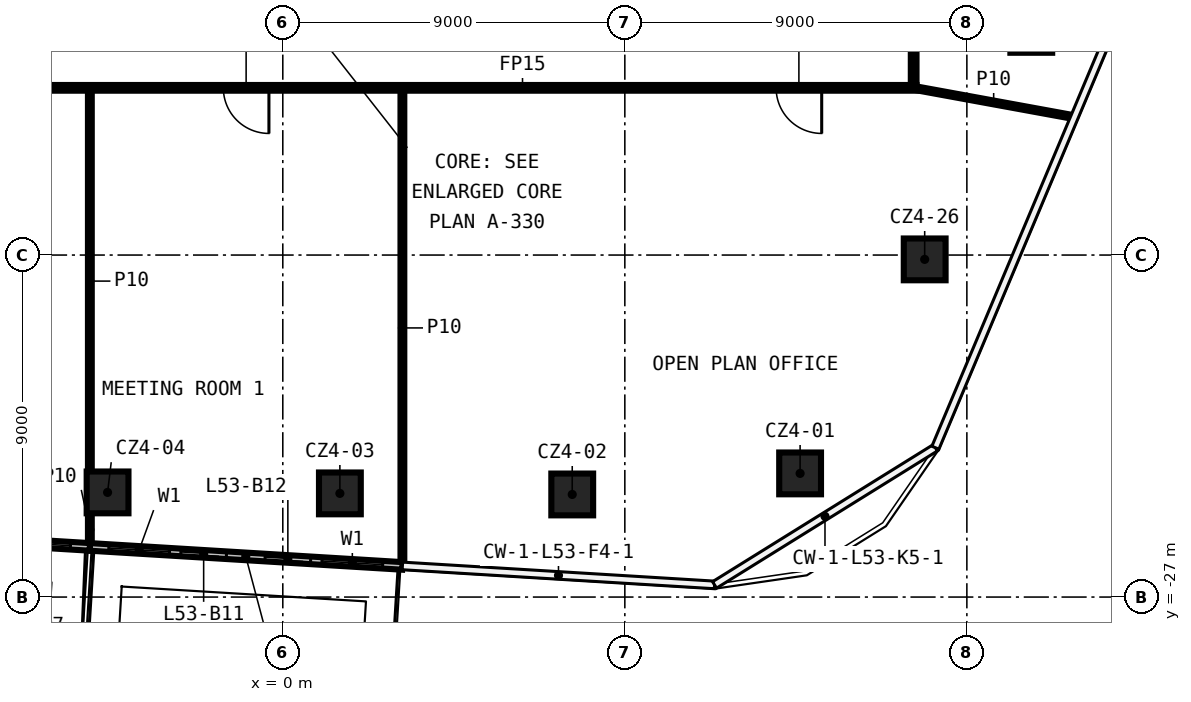
"""IFC4 building model, lengths in metres.
Left out: names, types, materials, properties, quantities, classifications, styles, units other than length and angle.
Written with IfcOpenShell. Run it as: python <this file> out.ifc"""

import sys

from ifc_helpers import new_model, si_unit, direction, frame, frame_2d, origin, origin_2d, place, context, subcontext, project, spatial, rectangle, extrude, element, fill, save


model = new_model("IFC4")
c1 = context("Model", 3, precision=1e-05, world=origin(), true_north=direction((0.0, 1.0)))
c2 = subcontext(c1, "Body", "Model", "MODEL_VIEW")
j1 = project(units=[si_unit("LENGTHUNIT", "METRE"), si_unit("PLANEANGLEUNIT", "RADIAN")], contexts=[c1])
p1 = place(None, origin())
s1 = spatial("IfcSite", under=j1, at=p1, CompositionType="ELEMENT")
p2 = place(p1, origin())
s2 = spatial("IfcBuilding", under=s1, at=p2, CompositionType="ELEMENT")
p3 = place(p2, frame((0.0, 0.0, 253.8)))
s3 = spatial("IfcBuildingStorey", under=s2, at=p3, CompositionType="ELEMENT", Elevation=253.8)
for number, where, z_axis, x_axis in (
    (1, (13.612, -23.746, 0.0), (0.0, 0.0, 1.0), (1.0, 0.0, 0.0)),
    (2, (7.616, -24.3, 0.0), (0.0, 0.0, 1.0), (1.0, 0.0, 0.0)),
    (3, (1.502, -24.272, 0.0), (0.0, 0.0, 1.0), (1.0, 0.0, 0.0)),
    (4, (-4.611, -24.246, 0.0), (0.0, 0.0, 1.0), (1.0, 0.0, 0.0)),
    (5, (19.695, -12.127, 0.0), (0.0, 0.0, 1.0), (1.0, 0.0, 0.0)),
    (6, (16.89, -18.114, 0.0), (0.0, 0.0, 1.0), (1.0, 0.0, 0.0)),
):
    element("IfcColumn", number, at=place(p3, frame(where, z_axis=z_axis, x_axis=x_axis)), inside=s3, PredefinedType="COLUMN", context=c2, shape_type="SweptSolid", body=[
        extrude(rectangle(XDim=1.1, YDim=1.1, at=origin_2d()), origin(), (0.0, 0.0, 1.0), 3.82),
    ])
p4 = place(p3, frame((16.675, -13.6, 0.0), z_axis=(0.0, 0.0, 1.0), x_axis=(-1.0, 0.0, 0.0)))
e7 = element("IfcWall", 7, at=p4, inside=s3, PredefinedType="PARTITIONING", context=c2, shape_type="SweptSolid", body=[
    extrude(rectangle(XDim=32.75, YDim=0.15, at=frame_2d((16.375, 0.0))), origin(), (0.0, 0.0, 1.0), 3.82),
])
p5 = place(p4, frame((29.587, 0.0, 0.0)))
e8 = element("IfcOpeningElement", 8, at=p5, cuts=e7, PredefinedType="OPENING", context=c2, shape_type="SweptSolid", body=[
    extrude(rectangle(XDim=1.2, YDim=2.1, at=frame_2d((0.6, 1.05))), frame((0.0, 0.085, 0.0), z_axis=(0.0, -1.0, 0.0), x_axis=(1.0, 0.0, 0.0)), (0.0, 0.0, 1.0), 0.17),
])
p6 = place(p4, frame((17.04, 0.0, 0.0)))
e9 = element("IfcOpeningElement", 9, at=p6, cuts=e7, PredefinedType="OPENING", context=c2, shape_type="SweptSolid", body=[
    extrude(rectangle(XDim=1.2, YDim=2.1, at=frame_2d((0.6, 1.05))), frame((0.0, 0.085, 0.0), z_axis=(0.0, -1.0, 0.0), x_axis=(1.0, 0.0, 0.0)), (0.0, 0.0, 1.0), 0.17),
])
p7 = place(p4, frame((2.495, 0.0, 0.0)))
e10 = element("IfcOpeningElement", 10, at=p7, cuts=e7, PredefinedType="OPENING", context=c2, shape_type="SweptSolid", body=[
    extrude(rectangle(XDim=1.2, YDim=2.1, at=frame_2d((0.6, 1.05))), frame((0.0, 0.085, 0.0), z_axis=(0.0, -1.0, 0.0), x_axis=(1.0, 0.0, 0.0)), (0.0, 0.0, 1.0), 0.17),
])
p8 = place(p3, frame((16.6, 13.525, 0.0), z_axis=(0.0, 0.0, 1.0), x_axis=(0.0, -1.0, 0.0)))
e11 = element("IfcWall", 11, at=p8, inside=s3, PredefinedType="PARTITIONING", context=c2, shape_type="SweptSolid", body=[
    extrude(rectangle(XDim=27.05, YDim=0.15, at=frame_2d((13.525, 0.0))), origin(), (0.0, 0.0, 1.0), 3.82),
])
p9 = place(p8, frame((22.559, 0.0, 0.0)))
e12 = element("IfcOpeningElement", 12, at=p9, cuts=e11, PredefinedType="OPENING", context=c2, shape_type="SweptSolid", body=[
    extrude(rectangle(XDim=1.2, YDim=2.1, at=frame_2d((0.6, 1.05))), frame((0.0, 0.085, 0.0), z_axis=(0.0, -1.0, 0.0), x_axis=(1.0, 0.0, 0.0)), (0.0, 0.0, 1.0), 0.17),
])
p10 = place(p8, frame((11.036, 0.0, 0.0)))
e13 = element("IfcOpeningElement", 13, at=p10, cuts=e11, PredefinedType="OPENING", context=c2, shape_type="SweptSolid", body=[
    extrude(rectangle(XDim=1.2, YDim=2.1, at=frame_2d((0.6, 1.05))), frame((0.0, 0.085, 0.0), z_axis=(0.0, -1.0, 0.0), x_axis=(1.0, 0.0, 0.0)), (0.0, 0.0, 1.0), 0.17),
])
p11 = place(p3, frame((3.147, -26.161, 0.0), z_axis=(0.0, 0.0, 1.0), x_axis=(0.0, 1.0, 0.0)))
e14 = element("IfcWall", 14, at=p11, inside=s3, PredefinedType="PARTITIONING", context=c2, shape_type="SweptSolid", body=[
    extrude(rectangle(XDim=12.486, YDim=0.1, at=frame_2d((6.243, 0.0))), origin(), (0.0, 0.0, 1.0), 3.82),
])
p12 = place(p3, frame((-5.077, -25.66, 0.0), z_axis=(0.0, 0.0, 1.0), x_axis=(0.0, 1.0, 0.0)))
e15 = element("IfcWall", 15, at=p12, inside=s3, PredefinedType="PARTITIONING", context=c2, shape_type="SweptSolid", body=[
    extrude(rectangle(XDim=0.864, YDim=0.1, at=frame_2d((0.432, 0.0))), origin(), (0.0, 0.0, 1.0), 3.82),
])
p13 = place(p3, frame((-5.077, -23.696, 0.0), z_axis=(0.0, 0.0, 1.0), x_axis=(0.0, 1.0, 0.0)))
e16 = element("IfcWall", 16, at=p13, inside=s3, PredefinedType="PARTITIONING", context=c2, shape_type="SweptSolid", body=[
    extrude(rectangle(XDim=10.021, YDim=0.1, at=frame_2d((5.01, 0.0))), origin(), (0.0, 0.0, 1.0), 3.82),
])
p14 = place(p3, frame((16.6, -13.6, 0.0), z_axis=(0.0, 0.0, 1.0), x_axis=(0.983699688502, -0.179819139254, 0.0)))
e17 = element("IfcWall", 17, at=p14, inside=s3, PredefinedType="PARTITIONING", context=c2, shape_type="SweptSolid", body=[
    extrude(rectangle(XDim=4.28, YDim=0.1, at=frame_2d((2.14, 0.0))), origin(), (0.0, 0.0, 1.0), 3.82),
])
p15 = place(p3, frame((-5.077, -25.68, 0.0), z_axis=(0.0, 0.0, 1.0), x_axis=(0.998153501879, -0.060741968084, 0.0)))
e18 = element("IfcWall", 18, at=p15, inside=s3, PredefinedType="SOLIDWALL", context=c2, shape_type="SweptSolid", body=[
    extrude(rectangle(XDim=8.24, YDim=0.2, at=frame_2d((4.12, 0.0))), origin(), (0.0, 0.0, 1.0), 3.82),
])
p16 = place(p15, frame((0.5, 0.0, 0.6)))
e19 = element("IfcOpeningElement", 19, at=p16, cuts=e18, PredefinedType="OPENING", context=c2, shape_type="SweptSolid", body=[
    extrude(rectangle(XDim=1.6, YDim=2.4, at=frame_2d((0.8, 1.2))), frame((0.0, 0.11, 0.0), z_axis=(0.0, -1.0, 0.0), x_axis=(1.0, 0.0, 0.0)), (0.0, 0.0, 1.0), 0.22),
])
p17 = place(p15, frame((2.4, 0.0, 0.0)))
e20 = element("IfcOpeningElement", 20, at=p17, cuts=e18, PredefinedType="OPENING", context=c2, shape_type="SweptSolid", body=[
    extrude(rectangle(XDim=1.2, YDim=2.4, at=frame_2d((0.6, 1.2))), frame((0.0, 0.11, 0.0), z_axis=(0.0, -1.0, 0.0), x_axis=(1.0, 0.0, 0.0)), (0.0, 0.0, 1.0), 0.22),
])
p18 = place(p15, frame((6.12, 0.0, 0.6)))
e21 = element("IfcOpeningElement", 21, at=p18, cuts=e18, PredefinedType="OPENING", context=c2, shape_type="SweptSolid", body=[
    extrude(rectangle(XDim=1.6, YDim=2.4, at=frame_2d((0.8, 1.2))), frame((0.0, 0.11, 0.0), z_axis=(0.0, -1.0, 0.0), x_axis=(1.0, 0.0, 0.0)), (0.0, 0.0, 1.0), 0.22),
])
p19 = place(p15, frame((4.62, 0.0, 0.0)))
e22 = element("IfcOpeningElement", 22, at=p19, cuts=e18, PredefinedType="OPENING", context=c2, shape_type="SweptSolid", body=[
    extrude(rectangle(XDim=1.2, YDim=2.4, at=frame_2d((0.6, 1.2))), frame((0.0, 0.11, 0.0), z_axis=(0.0, -1.0, 0.0), x_axis=(1.0, 0.0, 0.0)), (0.0, 0.0, 1.0), 0.22),
])
p20 = place(p3, frame((-9.181, -25.43, 0.0), z_axis=(0.0, 0.0, 1.0), x_axis=(0.998152924564, -0.060751454178, 0.0)))
e23 = element("IfcWall", 23, at=p20, inside=s3, PredefinedType="SOLIDWALL", context=c2, shape_type="SweptSolid", body=[
    extrude(rectangle(XDim=4.111, YDim=0.2, at=frame_2d((2.056, 0.0))), origin(), (0.0, 0.0, 1.0), 3.82),
])
p21 = place(p20, frame((2.0, 0.0, 0.6)))
e24 = element("IfcOpeningElement", 24, at=p21, cuts=e23, PredefinedType="OPENING", context=c2, shape_type="SweptSolid", body=[
    extrude(rectangle(XDim=1.6, YDim=2.4, at=frame_2d((0.8, 1.2))), frame((0.0, 0.11, 0.0), z_axis=(0.0, -1.0, 0.0), x_axis=(1.0, 0.0, 0.0)), (0.0, 0.0, 1.0), 0.22),
])
p22 = place(p20, frame((0.5, 0.0, 0.0)))
e25 = element("IfcOpeningElement", 25, at=p22, cuts=e23, PredefinedType="OPENING", context=c2, shape_type="SweptSolid", body=[
    extrude(rectangle(XDim=1.2, YDim=2.4, at=frame_2d((0.6, 1.2))), frame((0.0, 0.11, 0.0), z_axis=(0.0, -1.0, 0.0), x_axis=(1.0, 0.0, 0.0)), (0.0, 0.0, 1.0), 0.22),
])
p23 = place(p6, origin())
e26 = element("IfcDoor", 26, at=p23, inside=s3, OperationType="SINGLE_SWING_LEFT", PredefinedType="DOOR", context=c2, shape_type="SweptSolid", body=[
    extrude(rectangle(XDim=1.2, YDim=2.1, at=frame_2d((0.6, 1.05))), frame((0.0, 0.025, 0.0), z_axis=(0.0, -1.0, 0.0), x_axis=(1.0, 0.0, 0.0)), (0.0, 0.0, 1.0), 0.05),
])
fill(e9, e26)
p24 = place(p7, origin())
e27 = element("IfcDoor", 27, at=p24, inside=s3, OperationType="SINGLE_SWING_RIGHT", PredefinedType="DOOR", context=c2, shape_type="SweptSolid", body=[
    extrude(rectangle(XDim=1.2, YDim=2.1, at=frame_2d((0.6, 1.05))), frame((0.0, 0.025, 0.0), z_axis=(0.0, -1.0, 0.0), x_axis=(1.0, 0.0, 0.0)), (0.0, 0.0, 1.0), 0.05),
])
fill(e10, e27)
p25 = place(p16, origin())
e28 = element("IfcWindow", 28, at=p25, inside=s3, PartitioningType="SINGLE_PANEL", PredefinedType="WINDOW", context=c2, shape_type="SweptSolid", body=[
    extrude(rectangle(XDim=1.6, YDim=2.4, at=frame_2d((0.8, 1.2))), frame((0.0, 0.03, 0.0), z_axis=(0.0, -1.0, 0.0), x_axis=(1.0, 0.0, 0.0)), (0.0, 0.0, 1.0), 0.06),
])
fill(e19, e28)
p26 = place(p17, origin())
e29 = element("IfcDoor", 29, at=p26, inside=s3, OperationType="SLIDING_TO_LEFT", PredefinedType="DOOR", context=c2, shape_type="SweptSolid", body=[
    extrude(rectangle(XDim=1.2, YDim=2.4, at=frame_2d((0.6, 1.2))), frame((0.0, 0.025, 0.0), z_axis=(0.0, -1.0, 0.0), x_axis=(1.0, 0.0, 0.0)), (0.0, 0.0, 1.0), 0.05),
])
fill(e20, e29)
p27 = place(p18, origin())
e30 = element("IfcWindow", 30, at=p27, inside=s3, PartitioningType="SINGLE_PANEL", PredefinedType="WINDOW", context=c2, shape_type="SweptSolid", body=[
    extrude(rectangle(XDim=1.6, YDim=2.4, at=frame_2d((0.8, 1.2))), frame((0.0, 0.03, 0.0), z_axis=(0.0, -1.0, 0.0), x_axis=(1.0, 0.0, 0.0)), (0.0, 0.0, 1.0), 0.06),
])
fill(e21, e30)
p28 = place(p19, origin())
e31 = element("IfcDoor", 31, at=p28, inside=s3, OperationType="SLIDING_TO_LEFT", PredefinedType="DOOR", context=c2, shape_type="SweptSolid", body=[
    extrude(rectangle(XDim=1.2, YDim=2.4, at=frame_2d((0.6, 1.2))), frame((0.0, 0.025, 0.0), z_axis=(0.0, -1.0, 0.0), x_axis=(1.0, 0.0, 0.0)), (0.0, 0.0, 1.0), 0.05),
])
fill(e22, e31)
p29 = place(p21, origin())
e32 = element("IfcWindow", 32, at=p29, inside=s3, PartitioningType="SINGLE_PANEL", PredefinedType="WINDOW", context=c2, shape_type="SweptSolid", body=[
    extrude(rectangle(XDim=1.6, YDim=2.4, at=frame_2d((0.8, 1.2))), frame((0.0, 0.03, 0.0), z_axis=(0.0, -1.0, 0.0), x_axis=(1.0, 0.0, 0.0)), (0.0, 0.0, 1.0), 0.06),
])
fill(e24, e32)
save(model, sys.argv[1])
